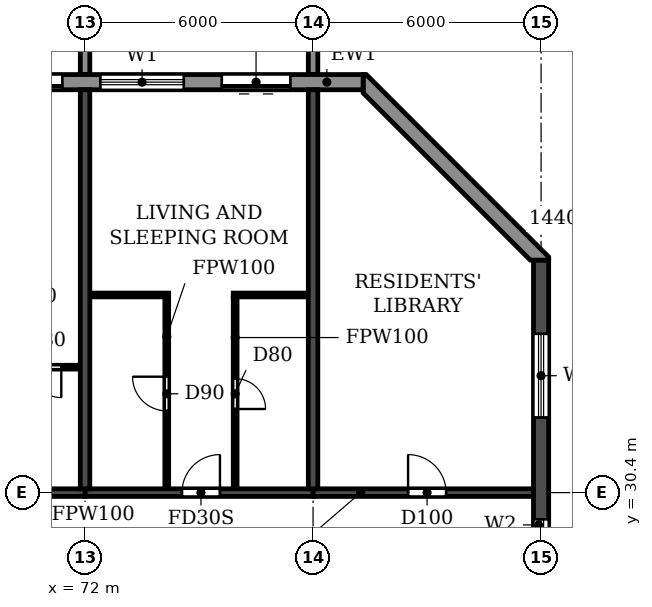
"""IFC4 building model, lengths in metres.
Left out: names, types, materials, properties, quantities, classifications, styles, units other than length and angle.
Written with IfcOpenShell. Run it as: python <this file> out.ifc"""

import sys

from ifc_helpers import new_model, si_unit, direction, frame, frame_2d, origin, place, context, subcontext, project, spatial, polyline, rectangle, outline, extrude, source, transform, mapped, element, fill, save


model = new_model("IFC4")
c1 = context("Model", 3, precision=1e-05, world=origin(), true_north=direction((0.0, 1.0)))
c2 = subcontext(c1, "Body", "Model", "MODEL_VIEW")
j1 = project(units=[si_unit("LENGTHUNIT", "METRE"), si_unit("PLANEANGLEUNIT", "RADIAN")], contexts=[c1])
p1 = place(None, origin())
s1 = spatial("IfcSite", under=j1, at=p1, CompositionType="ELEMENT")
p2 = place(p1, origin())
s2 = spatial("IfcBuilding", under=s1, at=p2, CompositionType="ELEMENT")
p3 = place(p2, frame((0.0, 0.0, 191.7)))
s3 = spatial("IfcBuildingStorey", under=s2, at=p3, CompositionType="ELEMENT", Elevation=191.7)
for number, where, z_axis, x_axis in (
    (1, (72.0, 30.5, 0.0), (0.0, 0.0, 1.0), (0.0, 1.0, 0.0)),
    (2, (78.0, 30.5, 0.0), (0.0, 0.0, 1.0), (0.0, 1.0, 0.0)),
):
    element("IfcWall", number, at=place(p3, frame(where, z_axis=z_axis, x_axis=x_axis)), inside=s3, PredefinedType="SHEAR", context=c2, shape_type="SweptSolid", body=[
        extrude(rectangle(XDim=10.5, YDim=0.25, at=frame_2d((5.25, 0.0))), origin(), (0.0, 0.0, 1.0), 3.08),
    ])
p4 = place(p3, frame((84.0, 4.683, 0.0), z_axis=(0.0, 0.0, 1.0), x_axis=(0.0, 1.0, 0.0)))
e3 = element("IfcWall", 3, at=p4, inside=s3, PredefinedType="SHEAR", context=c2, shape_type="SweptSolid", body=[
    extrude(rectangle(XDim=31.834, YDim=0.4, at=frame_2d((15.917, 0.0))), origin(), (0.0, 0.0, 1.0), 3.08),
])
p5 = place(p4, frame((23.817, 0.0, 0.9)))
e4 = element("IfcOpeningElement", 4, at=p5, cuts=e3, PredefinedType="OPENING", context=c2, shape_type="SweptSolid", body=[
    extrude(rectangle(XDim=1.2, YDim=1.5, at=frame_2d((0.6, 0.75))), frame((0.0, 0.21, 0.0), z_axis=(0.0, -1.0, 0.0), x_axis=(1.0, 0.0, 0.0)), (0.0, 0.0, 1.0), 0.42),
])
p6 = place(p4, frame((8.017, 0.0, 0.9)))
e5 = element("IfcOpeningElement", 5, at=p6, cuts=e3, PredefinedType="OPENING", context=c2, shape_type="SweptSolid", body=[
    extrude(rectangle(XDim=1.2, YDim=1.5, at=frame_2d((0.6, 0.75))), frame((0.0, 0.21, 0.0), z_axis=(0.0, -1.0, 0.0), x_axis=(1.0, 0.0, 0.0)), (0.0, 0.0, 1.0), 0.42),
])
p7 = place(p4, frame((27.694, 0.0, 0.6)))
e6 = element("IfcOpeningElement", 6, at=p7, cuts=e3, PredefinedType="OPENING", context=c2, shape_type="SweptSolid", body=[
    extrude(rectangle(XDim=2.2, YDim=1.8, at=frame_2d((1.1, 0.9))), frame((0.0, 0.21, 0.0), z_axis=(0.0, -1.0, 0.0), x_axis=(1.0, 0.0, 0.0)), (0.0, 0.0, 1.0), 0.42),
])
p8 = place(p4, frame((2.541, 0.0, 0.6)))
e7 = element("IfcOpeningElement", 7, at=p8, cuts=e3, PredefinedType="OPENING", context=c2, shape_type="SweptSolid", body=[
    extrude(rectangle(XDim=2.2, YDim=1.8, at=frame_2d((1.1, 0.9))), frame((0.0, 0.21, 0.0), z_axis=(0.0, -1.0, 0.0), x_axis=(1.0, 0.0, 0.0)), (0.0, 0.0, 1.0), 0.42),
])
p9 = place(p4, frame((15.917, 0.0, 0.9)))
e8 = element("IfcOpeningElement", 8, at=p9, cuts=e3, PredefinedType="OPENING", context=c2, shape_type="SweptSolid", body=[
    extrude(rectangle(XDim=1.2, YDim=1.5, at=frame_2d((0.6, 0.75))), frame((0.0, 0.21, 0.0), z_axis=(0.0, -1.0, 0.0), x_axis=(1.0, 0.0, 0.0)), (0.0, 0.0, 1.0), 0.42),
])
p10 = place(p3, frame((66.0, 30.4, 0.0), z_axis=(0.0, 0.0, 1.0), x_axis=(1.0, 0.0, 0.0)))
e9 = element("IfcWall", 9, at=p10, inside=s3, PredefinedType="SHEAR", context=c2, shape_type="SweptSolid", body=[
    extrude(rectangle(XDim=6.0, YDim=0.2, at=frame_2d((3.0, 0.0))), origin(), (0.0, 0.0, 1.0), 2.48),
])
p11 = place(p10, frame((2.55, 0.0, 0.0)))
e10 = element("IfcOpeningElement", 10, at=p11, cuts=e9, PredefinedType="OPENING", context=c2, shape_type="SweptSolid", body=[
    extrude(rectangle(XDim=1.0, YDim=2.1, at=frame_2d((0.5, 1.05))), frame((0.0, 0.11, 0.0), z_axis=(0.0, -1.0, 0.0), x_axis=(1.0, 0.0, 0.0)), (0.0, 0.0, 1.0), 0.22),
])
p12 = place(p3, frame((72.0, 30.4, 0.0), z_axis=(0.0, 0.0, 1.0), x_axis=(1.0, 0.0, 0.0)))
e11 = element("IfcWall", 11, at=p12, inside=s3, PredefinedType="SHEAR", context=c2, shape_type="SweptSolid", body=[
    extrude(rectangle(XDim=6.0, YDim=0.2, at=frame_2d((3.0, 0.0))), origin(), (0.0, 0.0, 1.0), 2.48),
])
p13 = place(p12, frame((2.55, 0.0, 0.0)))
e12 = element("IfcOpeningElement", 12, at=p13, cuts=e11, PredefinedType="OPENING", context=c2, shape_type="SweptSolid", body=[
    extrude(rectangle(XDim=1.0, YDim=2.1, at=frame_2d((0.5, 1.05))), frame((0.0, 0.11, 0.0), z_axis=(0.0, -1.0, 0.0), x_axis=(1.0, 0.0, 0.0)), (0.0, 0.0, 1.0), 0.22),
])
p14 = place(p3, frame((78.0, 30.4, 0.0), z_axis=(0.0, 0.0, 1.0), x_axis=(1.0, 0.0, 0.0)))
e13 = element("IfcWall", 13, at=p14, inside=s3, PredefinedType="SHEAR", context=c2, shape_type="SweptSolid", body=[
    extrude(rectangle(XDim=5.8, YDim=0.2, at=frame_2d((2.9, 0.0))), origin(), (0.0, 0.0, 1.0), 2.48),
])
p15 = place(p14, frame((2.5, 0.0, 0.0)))
e14 = element("IfcOpeningElement", 14, at=p15, cuts=e13, PredefinedType="OPENING", context=c2, shape_type="SweptSolid", body=[
    extrude(rectangle(XDim=1.0, YDim=2.1, at=frame_2d((0.5, 1.05))), frame((0.0, 0.11, 0.0), z_axis=(0.0, -1.0, 0.0), x_axis=(1.0, 0.0, 0.0)), (0.0, 0.0, 1.0), 0.22),
])
p16 = place(p3, origin())
e15 = element("IfcWall", 15, at=p16, inside=s3, PredefinedType="STANDARD", context=c2, shape_type="SweptSolid", body=[
    extrude(outline(polyline([(84.2, 36.517), (84.2, 36.6), (79.4, 41.4), (79.317, 41.4), (79.317, 40.917), (83.717, 36.517), (84.2, 36.517)])), origin(), (0.0, 0.0, 1.0), 3.08),
])
p17 = place(p3, frame((79.317, 41.2, 0.0), z_axis=(0.0, 0.0, 1.0), x_axis=(-1.0, 0.0, 0.0)))
e16 = element("IfcWall", 16, at=p17, inside=s3, PredefinedType="STANDARD", context=c2, shape_type="SweptSolid", body=[
    extrude(rectangle(XDim=56.634, YDim=0.4, at=frame_2d((28.317, 0.0))), origin(), (0.0, 0.0, 1.0), 3.08),
])
p18 = place(p17, frame((52.917, 0.0, 0.0)))
e17 = element("IfcOpeningElement", 17, at=p18, cuts=e16, PredefinedType="OPENING", context=c2, shape_type="SweptSolid", body=[
    extrude(rectangle(XDim=1.8, YDim=2.4, at=frame_2d((0.9, 1.2))), frame((0.0, 0.21, 0.0), z_axis=(0.0, -1.0, 0.0), x_axis=(1.0, 0.0, 0.0)), (0.0, 0.0, 1.0), 0.42),
])
p19 = place(p17, frame((49.717, 0.0, 0.9)))
e18 = element("IfcOpeningElement", 18, at=p19, cuts=e16, PredefinedType="OPENING", context=c2, shape_type="SweptSolid", body=[
    extrude(rectangle(XDim=2.2, YDim=1.5, at=frame_2d((1.1, 0.75))), frame((0.0, 0.21, 0.0), z_axis=(0.0, -1.0, 0.0), x_axis=(1.0, 0.0, 0.0)), (0.0, 0.0, 1.0), 0.42),
])
p20 = place(p17, frame((46.917, 0.0, 0.0)))
e19 = element("IfcOpeningElement", 19, at=p20, cuts=e16, PredefinedType="OPENING", context=c2, shape_type="SweptSolid", body=[
    extrude(rectangle(XDim=1.8, YDim=2.4, at=frame_2d((0.9, 1.2))), frame((0.0, 0.21, 0.0), z_axis=(0.0, -1.0, 0.0), x_axis=(1.0, 0.0, 0.0)), (0.0, 0.0, 1.0), 0.42),
])
p21 = place(p17, frame((43.717, 0.0, 0.9)))
e20 = element("IfcOpeningElement", 20, at=p21, cuts=e16, PredefinedType="OPENING", context=c2, shape_type="SweptSolid", body=[
    extrude(rectangle(XDim=2.2, YDim=1.5, at=frame_2d((1.1, 0.75))), frame((0.0, 0.21, 0.0), z_axis=(0.0, -1.0, 0.0), x_axis=(1.0, 0.0, 0.0)), (0.0, 0.0, 1.0), 0.42),
])
p22 = place(p17, frame((40.717, 0.0, 0.9)))
e21 = element("IfcOpeningElement", 21, at=p22, cuts=e16, PredefinedType="OPENING", context=c2, shape_type="SweptSolid", body=[
    extrude(rectangle(XDim=2.2, YDim=1.5, at=frame_2d((1.1, 0.75))), frame((0.0, 0.21, 0.0), z_axis=(0.0, -1.0, 0.0), x_axis=(1.0, 0.0, 0.0)), (0.0, 0.0, 1.0), 0.42),
])
p23 = place(p17, frame((37.717, 0.0, 0.9)))
e22 = element("IfcOpeningElement", 22, at=p23, cuts=e16, PredefinedType="OPENING", context=c2, shape_type="SweptSolid", body=[
    extrude(rectangle(XDim=2.2, YDim=1.5, at=frame_2d((1.1, 0.75))), frame((0.0, 0.21, 0.0), z_axis=(0.0, -1.0, 0.0), x_axis=(1.0, 0.0, 0.0)), (0.0, 0.0, 1.0), 0.42),
])
p24 = place(p17, frame((34.917, 0.0, 0.0)))
e23 = element("IfcOpeningElement", 23, at=p24, cuts=e16, PredefinedType="OPENING", context=c2, shape_type="SweptSolid", body=[
    extrude(rectangle(XDim=1.8, YDim=2.4, at=frame_2d((0.9, 1.2))), frame((0.0, 0.21, 0.0), z_axis=(0.0, -1.0, 0.0), x_axis=(1.0, 0.0, 0.0)), (0.0, 0.0, 1.0), 0.42),
])
p25 = place(p17, frame((31.717, 0.0, 0.9)))
e24 = element("IfcOpeningElement", 24, at=p25, cuts=e16, PredefinedType="OPENING", context=c2, shape_type="SweptSolid", body=[
    extrude(rectangle(XDim=2.2, YDim=1.5, at=frame_2d((1.1, 0.75))), frame((0.0, 0.21, 0.0), z_axis=(0.0, -1.0, 0.0), x_axis=(1.0, 0.0, 0.0)), (0.0, 0.0, 1.0), 0.42),
])
p26 = place(p17, frame((28.717, 0.0, 0.9)))
e25 = element("IfcOpeningElement", 25, at=p26, cuts=e16, PredefinedType="OPENING", context=c2, shape_type="SweptSolid", body=[
    extrude(rectangle(XDim=2.2, YDim=1.5, at=frame_2d((1.1, 0.75))), frame((0.0, 0.21, 0.0), z_axis=(0.0, -1.0, 0.0), x_axis=(1.0, 0.0, 0.0)), (0.0, 0.0, 1.0), 0.42),
])
p27 = place(p17, frame((25.717, 0.0, 0.9)))
e26 = element("IfcOpeningElement", 26, at=p27, cuts=e16, PredefinedType="OPENING", context=c2, shape_type="SweptSolid", body=[
    extrude(rectangle(XDim=2.2, YDim=1.5, at=frame_2d((1.1, 0.75))), frame((0.0, 0.21, 0.0), z_axis=(0.0, -1.0, 0.0), x_axis=(1.0, 0.0, 0.0)), (0.0, 0.0, 1.0), 0.42),
])
p28 = place(p17, frame((22.917, 0.0, 0.0)))
e27 = element("IfcOpeningElement", 27, at=p28, cuts=e16, PredefinedType="OPENING", context=c2, shape_type="SweptSolid", body=[
    extrude(rectangle(XDim=1.8, YDim=2.4, at=frame_2d((0.9, 1.2))), frame((0.0, 0.21, 0.0), z_axis=(0.0, -1.0, 0.0), x_axis=(1.0, 0.0, 0.0)), (0.0, 0.0, 1.0), 0.42),
])
p29 = place(p17, frame((19.717, 0.0, 0.9)))
e28 = element("IfcOpeningElement", 28, at=p29, cuts=e16, PredefinedType="OPENING", context=c2, shape_type="SweptSolid", body=[
    extrude(rectangle(XDim=2.2, YDim=1.5, at=frame_2d((1.1, 0.75))), frame((0.0, 0.21, 0.0), z_axis=(0.0, -1.0, 0.0), x_axis=(1.0, 0.0, 0.0)), (0.0, 0.0, 1.0), 0.42),
])
p30 = place(p17, frame((16.717, 0.0, 0.9)))
e29 = element("IfcOpeningElement", 29, at=p30, cuts=e16, PredefinedType="OPENING", context=c2, shape_type="SweptSolid", body=[
    extrude(rectangle(XDim=2.2, YDim=1.5, at=frame_2d((1.1, 0.75))), frame((0.0, 0.21, 0.0), z_axis=(0.0, -1.0, 0.0), x_axis=(1.0, 0.0, 0.0)), (0.0, 0.0, 1.0), 0.42),
])
p31 = place(p17, frame((13.717, 0.0, 0.9)))
e30 = element("IfcOpeningElement", 30, at=p31, cuts=e16, PredefinedType="OPENING", context=c2, shape_type="SweptSolid", body=[
    extrude(rectangle(XDim=2.2, YDim=1.5, at=frame_2d((1.1, 0.75))), frame((0.0, 0.21, 0.0), z_axis=(0.0, -1.0, 0.0), x_axis=(1.0, 0.0, 0.0)), (0.0, 0.0, 1.0), 0.42),
])
p32 = place(p17, frame((10.717, 0.0, 0.9)))
e31 = element("IfcOpeningElement", 31, at=p32, cuts=e16, PredefinedType="OPENING", context=c2, shape_type="SweptSolid", body=[
    extrude(rectangle(XDim=2.2, YDim=1.5, at=frame_2d((1.1, 0.75))), frame((0.0, 0.21, 0.0), z_axis=(0.0, -1.0, 0.0), x_axis=(1.0, 0.0, 0.0)), (0.0, 0.0, 1.0), 0.42),
])
p33 = place(p17, frame((7.917, 0.0, 0.0)))
e32 = element("IfcOpeningElement", 32, at=p33, cuts=e16, PredefinedType="OPENING", context=c2, shape_type="SweptSolid", body=[
    extrude(rectangle(XDim=1.8, YDim=2.4, at=frame_2d((0.9, 1.2))), frame((0.0, 0.21, 0.0), z_axis=(0.0, -1.0, 0.0), x_axis=(1.0, 0.0, 0.0)), (0.0, 0.0, 1.0), 0.42),
])
p34 = place(p17, frame((4.717, 0.0, 0.9)))
e33 = element("IfcOpeningElement", 33, at=p34, cuts=e16, PredefinedType="OPENING", context=c2, shape_type="SweptSolid", body=[
    extrude(rectangle(XDim=2.2, YDim=1.5, at=frame_2d((1.1, 0.75))), frame((0.0, 0.21, 0.0), z_axis=(0.0, -1.0, 0.0), x_axis=(1.0, 0.0, 0.0)), (0.0, 0.0, 1.0), 0.42),
])
p35 = place(p17, frame((1.917, 0.0, 0.0)))
e34 = element("IfcOpeningElement", 34, at=p35, cuts=e16, PredefinedType="OPENING", context=c2, shape_type="SweptSolid", body=[
    extrude(rectangle(XDim=1.8, YDim=2.4, at=frame_2d((0.9, 1.2))), frame((0.0, 0.21, 0.0), z_axis=(0.0, -1.0, 0.0), x_axis=(1.0, 0.0, 0.0)), (0.0, 0.0, 1.0), 0.42),
])
m1 = source(origin(), c2, "Body", "SweptSolid", [
    extrude(outline(polyline([(0.0, 0.0), (0.25, 0.0), (0.25, 3.1), (0.0, 3.1), (0.0, 0.0)])), origin(), (0.0, 0.0, 1.0), 3.1),
])
for number, where in (
    (35, (71.875, 41.4, 0.0)),
    (36, (77.875, 41.4, 0.0)),
):
    element("IfcWall", number, at=place(p3, frame(where)), inside=s3, PredefinedType="STANDARD", context=c2, shape_type="MappedRepresentation", body=[
        mapped(m1, transform((0.0, 0.0, 0.0))),
    ])
p36 = place(p3, frame((69.9, 33.7, 0.0), z_axis=(0.0, 0.0, 1.0), x_axis=(1.0, 0.0, 0.0)))
e37 = element("IfcWall", 37, at=p36, inside=s3, PredefinedType="PARTITIONING", context=c2, shape_type="SweptSolid", body=[
    extrude(rectangle(XDim=1.965, YDim=0.1, at=frame_2d((0.982, 0.0))), origin(), (0.0, 0.0, 1.0), 3.08),
])
p37 = place(p36, frame((0.675, 0.0, 0.0)))
e38 = element("IfcOpeningElement", 38, at=p37, cuts=e37, PredefinedType="OPENING", context=c2, shape_type="SweptSolid", body=[
    extrude(rectangle(XDim=0.8, YDim=2.1, at=frame_2d((0.4, 1.05))), frame((0.0, 0.06, 0.0), z_axis=(0.0, -1.0, 0.0), x_axis=(1.0, 0.0, 0.0)), (0.0, 0.0, 1.0), 0.12),
])
p38 = place(p3, frame((72.135, 35.6, 0.0), z_axis=(0.0, 0.0, 1.0), x_axis=(1.0, 0.0, 0.0)))
e39 = element("IfcWall", 39, at=p38, inside=s3, PredefinedType="PARTITIONING", context=c2, shape_type="SweptSolid", body=[
    extrude(rectangle(XDim=2.065, YDim=0.1, at=frame_2d((1.032, 0.0))), origin(), (0.0, 0.0, 1.0), 3.08),
])
p39 = place(p3, frame((75.9, 35.6, 0.0), z_axis=(0.0, 0.0, 1.0), x_axis=(1.0, 0.0, 0.0)))
e40 = element("IfcWall", 40, at=p39, inside=s3, PredefinedType="PARTITIONING", context=c2, shape_type="SweptSolid", body=[
    extrude(rectangle(XDim=1.965, YDim=0.1, at=frame_2d((0.982, 0.0))), origin(), (0.0, 0.0, 1.0), 3.08),
])
p40 = place(p3, frame((74.15, 30.51, 0.0), z_axis=(0.0, 0.0, 1.0), x_axis=(0.0, 1.0, 0.0)))
e41 = element("IfcWall", 41, at=p40, inside=s3, PredefinedType="PARTITIONING", context=c2, shape_type="SweptSolid", body=[
    extrude(rectangle(XDim=5.04, YDim=0.1, at=frame_2d((2.52, 0.0))), origin(), (0.0, 0.0, 1.0), 3.08),
])
p41 = place(p40, frame((2.04, 0.0, 0.0)))
e42 = element("IfcOpeningElement", 42, at=p41, cuts=e41, PredefinedType="OPENING", context=c2, shape_type="SweptSolid", body=[
    extrude(rectangle(XDim=0.9, YDim=2.1, at=frame_2d((0.45, 1.05))), frame((0.0, 0.06, 0.0), z_axis=(0.0, -1.0, 0.0), x_axis=(1.0, 0.0, 0.0)), (0.0, 0.0, 1.0), 0.12),
])
p42 = place(p3, frame((75.95, 30.51, 0.0), z_axis=(0.0, 0.0, 1.0), x_axis=(0.0, 1.0, 0.0)))
e43 = element("IfcWall", 43, at=p42, inside=s3, PredefinedType="PARTITIONING", context=c2, shape_type="SweptSolid", body=[
    extrude(rectangle(XDim=5.04, YDim=0.1, at=frame_2d((2.52, 0.0))), origin(), (0.0, 0.0, 1.0), 3.08),
])
p43 = place(p42, frame((2.09, 0.0, 0.0)))
e44 = element("IfcOpeningElement", 44, at=p43, cuts=e43, PredefinedType="OPENING", context=c2, shape_type="SweptSolid", body=[
    extrude(rectangle(XDim=0.8, YDim=2.1, at=frame_2d((0.4, 1.05))), frame((0.0, 0.06, 0.0), z_axis=(0.0, -1.0, 0.0), x_axis=(1.0, 0.0, 0.0)), (0.0, 0.0, 1.0), 0.12),
])
p44 = place(p5, origin())
e45 = element("IfcWindow", 45, at=p44, inside=s3, PartitioningType="SINGLE_PANEL", PredefinedType="WINDOW", context=c2, shape_type="SweptSolid", body=[
    extrude(rectangle(XDim=1.2, YDim=1.5, at=frame_2d((0.6, 0.75))), frame((0.0, 0.03, 0.0), z_axis=(0.0, -1.0, 0.0), x_axis=(1.0, 0.0, 0.0)), (0.0, 0.0, 1.0), 0.06),
])
fill(e4, e45)
p45 = place(p7, origin())
e46 = element("IfcWindow", 46, at=p45, inside=s3, PartitioningType="DOUBLE_PANEL_HORIZONTAL", PredefinedType="WINDOW", context=c2, shape_type="SweptSolid", body=[
    extrude(rectangle(XDim=2.2, YDim=1.8, at=frame_2d((1.1, 0.9))), frame((0.0, 0.03, 0.0), z_axis=(0.0, -1.0, 0.0), x_axis=(1.0, 0.0, 0.0)), (0.0, 0.0, 1.0), 0.06),
])
fill(e6, e46)
p46 = place(p33, origin())
e47 = element("IfcDoor", 47, at=p46, inside=s3, OperationType="DOUBLE_DOOR_SLIDING", PredefinedType="DOOR", context=c2, shape_type="SweptSolid", body=[
    extrude(rectangle(XDim=1.8, YDim=2.4, at=frame_2d((0.9, 1.2))), frame((0.0, 0.025, 0.0), z_axis=(0.0, -1.0, 0.0), x_axis=(1.0, 0.0, 0.0)), (0.0, 0.0, 1.0), 0.05),
])
fill(e32, e47)
p47 = place(p34, origin())
e48 = element("IfcWindow", 48, at=p47, inside=s3, PartitioningType="DOUBLE_PANEL_HORIZONTAL", PredefinedType="WINDOW", context=c2, shape_type="SweptSolid", body=[
    extrude(rectangle(XDim=2.2, YDim=1.5, at=frame_2d((1.1, 0.75))), frame((0.0, 0.03, 0.0), z_axis=(0.0, -1.0, 0.0), x_axis=(1.0, 0.0, 0.0)), (0.0, 0.0, 1.0), 0.06),
])
fill(e33, e48)
p48 = place(p35, origin())
e49 = element("IfcDoor", 49, at=p48, inside=s3, OperationType="DOUBLE_DOOR_SLIDING", PredefinedType="DOOR", context=c2, shape_type="SweptSolid", body=[
    extrude(rectangle(XDim=1.8, YDim=2.4, at=frame_2d((0.9, 1.2))), frame((0.0, 0.025, 0.0), z_axis=(0.0, -1.0, 0.0), x_axis=(1.0, 0.0, 0.0)), (0.0, 0.0, 1.0), 0.05),
])
fill(e34, e49)
p49 = place(p37, frame((0.8, 0.0, 0.0), z_axis=(0.0, 0.0, 1.0), x_axis=(-1.0, 0.0, 0.0)))
e50 = element("IfcDoor", 50, at=p49, inside=s3, OperationType="SINGLE_SWING_LEFT", PredefinedType="DOOR", context=c2, shape_type="SweptSolid", body=[
    extrude(rectangle(XDim=0.8, YDim=2.1, at=frame_2d((0.4, 1.05))), frame((0.0, 0.025, 0.0), z_axis=(0.0, -1.0, 0.0), x_axis=(1.0, 0.0, 0.0)), (0.0, 0.0, 1.0), 0.05),
])
fill(e38, e50)
p50 = place(p41, origin())
e51 = element("IfcDoor", 51, at=p50, inside=s3, OperationType="SINGLE_SWING_RIGHT", PredefinedType="DOOR", context=c2, shape_type="SweptSolid", body=[
    extrude(rectangle(XDim=0.9, YDim=2.1, at=frame_2d((0.45, 1.05))), frame((0.0, 0.025, 0.0), z_axis=(0.0, -1.0, 0.0), x_axis=(1.0, 0.0, 0.0)), (0.0, 0.0, 1.0), 0.05),
])
fill(e42, e51)
p51 = place(p13, origin())
e52 = element("IfcDoor", 52, at=p51, inside=s3, OperationType="SINGLE_SWING_RIGHT", PredefinedType="DOOR", context=c2, shape_type="SweptSolid", body=[
    extrude(rectangle(XDim=1.0, YDim=2.1, at=frame_2d((0.5, 1.05))), frame((0.0, 0.025, 0.0), z_axis=(0.0, -1.0, 0.0), x_axis=(1.0, 0.0, 0.0)), (0.0, 0.0, 1.0), 0.05),
])
fill(e12, e52)
p52 = place(p43, frame((0.8, 0.0, 0.0), z_axis=(0.0, 0.0, 1.0), x_axis=(-1.0, 0.0, 0.0)))
e53 = element("IfcDoor", 53, at=p52, inside=s3, OperationType="SINGLE_SWING_RIGHT", PredefinedType="DOOR", context=c2, shape_type="SweptSolid", body=[
    extrude(rectangle(XDim=0.8, YDim=2.1, at=frame_2d((0.4, 1.05))), frame((0.0, 0.025, 0.0), z_axis=(0.0, -1.0, 0.0), x_axis=(1.0, 0.0, 0.0)), (0.0, 0.0, 1.0), 0.05),
])
fill(e44, e53)
p53 = place(p15, origin())
e54 = element("IfcDoor", 54, at=p53, inside=s3, OperationType="SINGLE_SWING_LEFT", PredefinedType="DOOR", context=c2, shape_type="SweptSolid", body=[
    extrude(rectangle(XDim=1.0, YDim=2.1, at=frame_2d((0.5, 1.05))), frame((0.0, 0.025, 0.0), z_axis=(0.0, -1.0, 0.0), x_axis=(1.0, 0.0, 0.0)), (0.0, 0.0, 1.0), 0.05),
])
fill(e14, e54)
save(model, sys.argv[1])
